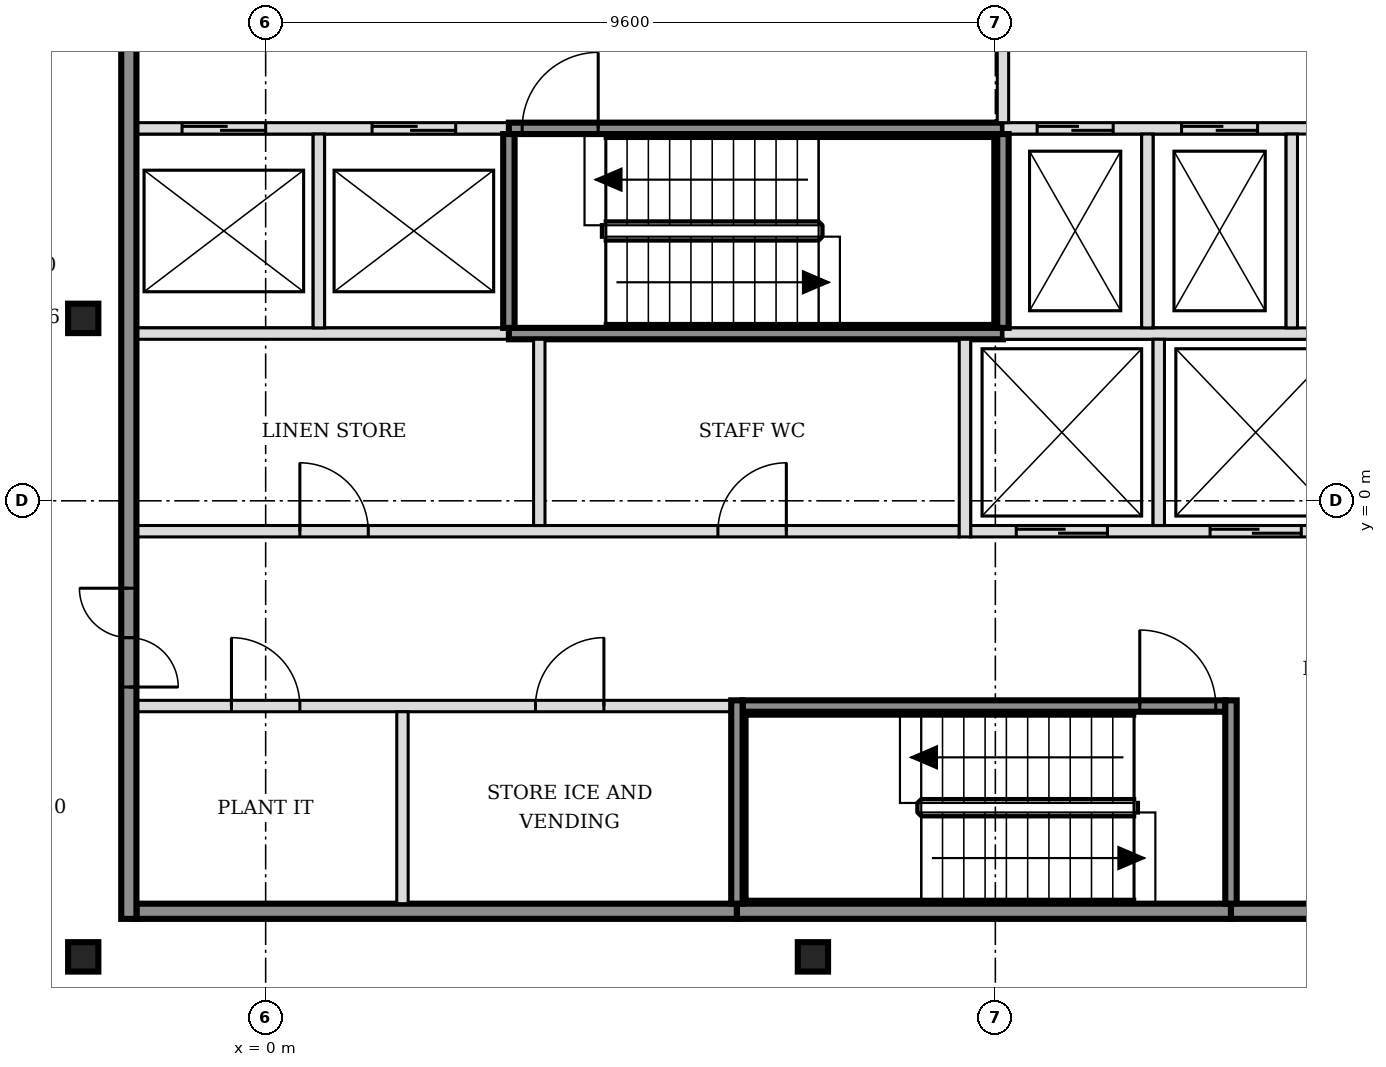
"""IFC4 building model, lengths in metres.
Left out: names, types, materials, properties, quantities, classifications, styles, units other than length and angle.
Written with IfcOpenShell. Run it as: python <this file> out.ifc"""

import sys

from ifc_helpers import new_model, si_unit, direction, frame, frame_2d, origin, origin_2d, place, context, subcontext, project, spatial, rectangle, i_section, extrude, element, fill, save


model = new_model("IFC4")
c1 = context("Model", 3, precision=1e-05, world=origin(), true_north=direction((0.0, 1.0)))
c2 = subcontext(c1, "Body", "Model", "MODEL_VIEW")
j1 = project(units=[si_unit("LENGTHUNIT", "METRE"), si_unit("PLANEANGLEUNIT", "RADIAN")], contexts=[c1])
p1 = place(None, origin())
s1 = spatial("IfcSite", under=j1, at=p1, CompositionType="ELEMENT")
p2 = place(p1, origin())
s2 = spatial("IfcBuilding", under=s1, at=p2, CompositionType="ELEMENT")
p3 = place(p2, frame((0.0, 0.0, 253.8)))
s3 = spatial("IfcBuildingStorey", under=s2, at=p3, CompositionType="ELEMENT", Elevation=253.8)
for number, where, z_axis, x_axis in (
    (1, (-2.4, -6.0, -0.15), (0.0, 0.0, 1.0), (1.0, 0.0, 0.0)),
    (2, (7.2, -6.0, -0.15), (0.0, 0.0, 1.0), (1.0, 0.0, 0.0)),
    (3, (-2.4, 2.4, -0.15), (0.0, 0.0, 1.0), (1.0, 0.0, 0.0)),
):
    element("IfcColumn", number, at=place(p3, frame(where, z_axis=z_axis, x_axis=x_axis)), inside=s3, PredefinedType="COLUMN", context=c2, shape_type="SweptSolid", body=[
        extrude(i_section(OverallWidth=0.398, OverallDepth=0.387, WebThickness=0.021, FlangeThickness=0.033, FilletRadius=0.015, at=origin_2d()), origin(), (0.0, 0.0, 1.0), 3.6),
    ])
p4 = place(p3, frame((-1.7, -5.4, 0.0), z_axis=(0.0, 0.0, 1.0), x_axis=(1.0, 0.0, 0.0)))
e4 = element("IfcWall", 4, at=p4, inside=s3, PredefinedType="SOLIDWALL", context=c2, shape_type="SweptSolid", body=[
    extrude(rectangle(XDim=7.9, YDim=0.2, at=frame_2d((3.95, 0.0))), origin(), (0.0, 0.0, 1.0), 3.45),
])
p5 = place(p3, frame((6.2, -5.4, 0.0), z_axis=(0.0, 0.0, 1.0), x_axis=(1.0, 0.0, 0.0)))
e5 = element("IfcWall", 5, at=p5, inside=s3, PredefinedType="SOLIDWALL", context=c2, shape_type="SweptSolid", body=[
    extrude(rectangle(XDim=6.5, YDim=0.2, at=frame_2d((3.25, 0.0))), origin(), (0.0, 0.0, 1.0), 3.45),
])
p6 = place(p3, frame((12.7, -5.4, 0.0), z_axis=(0.0, 0.0, 1.0), x_axis=(1.0, 0.0, 0.0)))
e6 = element("IfcWall", 6, at=p6, inside=s3, PredefinedType="SOLIDWALL", context=c2, shape_type="SweptSolid", body=[
    extrude(rectangle(XDim=3.4, YDim=0.2, at=frame_2d((1.7, 0.0))), origin(), (0.0, 0.0, 1.0), 3.45),
])
p7 = place(p3, frame((-1.7, -2.7, 0.0), z_axis=(0.0, 0.0, 1.0), x_axis=(1.0, 0.0, 0.0)))
e7 = element("IfcWall", 7, at=p7, inside=s3, PredefinedType="PARTITIONING", context=c2, shape_type="SweptSolid", body=[
    extrude(rectangle(XDim=7.825, YDim=0.15, at=frame_2d((3.913, 0.0))), origin(), (0.0, 0.0, 1.0), 3.45),
])
p8 = place(p7, frame((1.25, 0.0, 0.0)))
e8 = element("IfcOpeningElement", 8, at=p8, cuts=e7, PredefinedType="OPENING", context=c2, shape_type="SweptSolid", body=[
    extrude(rectangle(XDim=0.9, YDim=2.1, at=frame_2d((0.45, 1.05))), frame((0.0, 0.085, 0.0), z_axis=(0.0, -1.0, 0.0), x_axis=(1.0, 0.0, 0.0)), (0.0, 0.0, 1.0), 0.17),
])
p9 = place(p7, frame((5.25, 0.0, 0.0)))
e9 = element("IfcOpeningElement", 9, at=p9, cuts=e7, PredefinedType="OPENING", context=c2, shape_type="SweptSolid", body=[
    extrude(rectangle(XDim=0.9, YDim=2.1, at=frame_2d((0.45, 1.05))), frame((0.0, 0.085, 0.0), z_axis=(0.0, -1.0, 0.0), x_axis=(1.0, 0.0, 0.0)), (0.0, 0.0, 1.0), 0.17),
])
p10 = place(p3, frame((6.275, -2.7, 0.0), z_axis=(0.0, 0.0, 1.0), x_axis=(1.0, 0.0, 0.0)))
e10 = element("IfcWall", 10, at=p10, inside=s3, PredefinedType="SOLIDWALL", context=c2, shape_type="SweptSolid", body=[
    extrude(rectangle(XDim=6.35, YDim=0.15, at=frame_2d((3.175, 0.0))), origin(), (0.0, 0.0, 1.0), 3.45),
])
p11 = place(p10, frame((5.225, 0.0, 0.0)))
e11 = element("IfcOpeningElement", 11, at=p11, cuts=e10, PredefinedType="OPENING", context=c2, shape_type="SweptSolid", body=[
    extrude(rectangle(XDim=1.0, YDim=2.1, at=frame_2d((0.5, 1.05))), frame((0.0, 0.085, 0.0), z_axis=(0.0, -1.0, 0.0), x_axis=(1.0, 0.0, 0.0)), (0.0, 0.0, 1.0), 0.17),
])
p12 = place(p3, frame((-1.7, -0.4, 0.0), z_axis=(0.0, 0.0, 1.0), x_axis=(1.0, 0.0, 0.0)))
e12 = element("IfcWall", 12, at=p12, inside=s3, PredefinedType="PARTITIONING", context=c2, shape_type="SweptSolid", body=[
    extrude(rectangle(XDim=10.825, YDim=0.15, at=frame_2d((5.413, 0.0))), origin(), (0.0, 0.0, 1.0), 3.45),
])
p13 = place(p12, frame((2.15, 0.0, 0.0)))
e13 = element("IfcOpeningElement", 13, at=p13, cuts=e12, PredefinedType="OPENING", context=c2, shape_type="SweptSolid", body=[
    extrude(rectangle(XDim=0.9, YDim=2.1, at=frame_2d((0.45, 1.05))), frame((0.0, 0.085, 0.0), z_axis=(0.0, -1.0, 0.0), x_axis=(1.0, 0.0, 0.0)), (0.0, 0.0, 1.0), 0.17),
])
p14 = place(p12, frame((7.65, 0.0, 0.0)))
e14 = element("IfcOpeningElement", 14, at=p14, cuts=e12, PredefinedType="OPENING", context=c2, shape_type="SweptSolid", body=[
    extrude(rectangle(XDim=0.9, YDim=2.1, at=frame_2d((0.45, 1.05))), frame((0.0, 0.085, 0.0), z_axis=(0.0, -1.0, 0.0), x_axis=(1.0, 0.0, 0.0)), (0.0, 0.0, 1.0), 0.17),
])
p15 = place(p3, frame((9.275, -0.4, 0.0), z_axis=(0.0, 0.0, 1.0), x_axis=(1.0, 0.0, 0.0)))
e15 = element("IfcWall", 15, at=p15, inside=s3, PredefinedType="SOLIDWALL", context=c2, shape_type="SweptSolid", body=[
    extrude(rectangle(XDim=4.95, YDim=0.15, at=frame_2d((2.475, 0.0))), origin(), (0.0, 0.0, 1.0), 3.45),
])
p16 = place(p15, frame((0.6, 0.0, 0.0)))
e16 = element("IfcOpeningElement", 16, at=p16, cuts=e15, PredefinedType="OPENING", context=c2, shape_type="SweptSolid", body=[
    extrude(rectangle(XDim=1.2, YDim=2.1, at=frame_2d((0.6, 1.05))), frame((0.0, 0.085, 0.0), z_axis=(0.0, -1.0, 0.0), x_axis=(1.0, 0.0, 0.0)), (0.0, 0.0, 1.0), 0.17),
])
p17 = place(p15, frame((3.15, 0.0, 0.0)))
e17 = element("IfcOpeningElement", 17, at=p17, cuts=e15, PredefinedType="OPENING", context=c2, shape_type="SweptSolid", body=[
    extrude(rectangle(XDim=1.2, YDim=2.1, at=frame_2d((0.6, 1.05))), frame((0.0, 0.085, 0.0), z_axis=(0.0, -1.0, 0.0), x_axis=(1.0, 0.0, 0.0)), (0.0, 0.0, 1.0), 0.17),
])
p18 = place(p3, frame((-1.7, 2.2, 0.0), z_axis=(0.0, 0.0, 1.0), x_axis=(1.0, 0.0, 0.0)))
e18 = element("IfcWall", 18, at=p18, inside=s3, PredefinedType="SOLIDWALL", context=c2, shape_type="SweptSolid", body=[
    extrude(rectangle(XDim=4.9, YDim=0.15, at=frame_2d((2.45, 0.0))), origin(), (0.0, 0.0, 1.0), 3.45),
])
p19 = place(p3, frame((3.2, 2.2, 0.0), z_axis=(0.0, 0.0, 1.0), x_axis=(1.0, 0.0, 0.0)))
e19 = element("IfcWall", 19, at=p19, inside=s3, PredefinedType="SOLIDWALL", context=c2, shape_type="SweptSolid", body=[
    extrude(rectangle(XDim=6.5, YDim=0.15, at=frame_2d((3.25, 0.0))), origin(), (0.0, 0.0, 1.0), 3.45),
])
p20 = place(p3, frame((9.7, 2.2, 0.0), z_axis=(0.0, 0.0, 1.0), x_axis=(1.0, 0.0, 0.0)))
e20 = element("IfcWall", 20, at=p20, inside=s3, PredefinedType="SOLIDWALL", context=c2, shape_type="SweptSolid", body=[
    extrude(rectangle(XDim=4.525, YDim=0.15, at=frame_2d((2.263, 0.0))), origin(), (0.0, 0.0, 1.0), 3.45),
])
p21 = place(p3, frame((-1.7, 4.9, 0.0), z_axis=(0.0, 0.0, 1.0), x_axis=(1.0, 0.0, 0.0)))
e21 = element("IfcWall", 21, at=p21, inside=s3, PredefinedType="SOLIDWALL", context=c2, shape_type="SweptSolid", body=[
    extrude(rectangle(XDim=4.9, YDim=0.15, at=frame_2d((2.45, 0.0))), origin(), (0.0, 0.0, 1.0), 3.45),
])
p22 = place(p21, frame((0.6, 0.0, 0.0)))
e22 = element("IfcOpeningElement", 22, at=p22, cuts=e21, PredefinedType="OPENING", context=c2, shape_type="SweptSolid", body=[
    extrude(rectangle(XDim=1.1, YDim=2.1, at=frame_2d((0.55, 1.05))), frame((0.0, 0.085, 0.0), z_axis=(0.0, -1.0, 0.0), x_axis=(1.0, 0.0, 0.0)), (0.0, 0.0, 1.0), 0.17),
])
p23 = place(p21, frame((3.1, 0.0, 0.0)))
e23 = element("IfcOpeningElement", 23, at=p23, cuts=e21, PredefinedType="OPENING", context=c2, shape_type="SweptSolid", body=[
    extrude(rectangle(XDim=1.1, YDim=2.1, at=frame_2d((0.55, 1.05))), frame((0.0, 0.085, 0.0), z_axis=(0.0, -1.0, 0.0), x_axis=(1.0, 0.0, 0.0)), (0.0, 0.0, 1.0), 0.17),
])
p24 = place(p3, frame((3.2, 4.9, 0.0), z_axis=(0.0, 0.0, 1.0), x_axis=(1.0, 0.0, 0.0)))
e24 = element("IfcWall", 24, at=p24, inside=s3, PredefinedType="SOLIDWALL", context=c2, shape_type="SweptSolid", body=[
    extrude(rectangle(XDim=6.5, YDim=0.15, at=frame_2d((3.25, 0.0))), origin(), (0.0, 0.0, 1.0), 3.45),
])
p25 = place(p24, frame((0.175, 0.0, 0.0)))
e25 = element("IfcOpeningElement", 25, at=p25, cuts=e24, PredefinedType="OPENING", context=c2, shape_type="SweptSolid", body=[
    extrude(rectangle(XDim=1.0, YDim=2.1, at=frame_2d((0.5, 1.05))), frame((0.0, 0.085, 0.0), z_axis=(0.0, -1.0, 0.0), x_axis=(1.0, 0.0, 0.0)), (0.0, 0.0, 1.0), 0.17),
])
p26 = place(p3, frame((9.7, 4.9, 0.0), z_axis=(0.0, 0.0, 1.0), x_axis=(1.0, 0.0, 0.0)))
e26 = element("IfcWall", 26, at=p26, inside=s3, PredefinedType="SOLIDWALL", context=c2, shape_type="SweptSolid", body=[
    extrude(rectangle(XDim=6.4, YDim=0.15, at=frame_2d((3.2, 0.0))), origin(), (0.0, 0.0, 1.0), 3.45),
])
p27 = place(p26, frame((0.45, 0.0, 0.0)))
e27 = element("IfcOpeningElement", 27, at=p27, cuts=e26, PredefinedType="OPENING", context=c2, shape_type="SweptSolid", body=[
    extrude(rectangle(XDim=1.0, YDim=2.1, at=frame_2d((0.5, 1.05))), frame((0.0, 0.085, 0.0), z_axis=(0.0, -1.0, 0.0), x_axis=(1.0, 0.0, 0.0)), (0.0, 0.0, 1.0), 0.17),
])
p28 = place(p26, frame((2.35, 0.0, 0.0)))
e28 = element("IfcOpeningElement", 28, at=p28, cuts=e26, PredefinedType="OPENING", context=c2, shape_type="SweptSolid", body=[
    extrude(rectangle(XDim=1.0, YDim=2.1, at=frame_2d((0.5, 1.05))), frame((0.0, 0.085, 0.0), z_axis=(0.0, -1.0, 0.0), x_axis=(1.0, 0.0, 0.0)), (0.0, 0.0, 1.0), 0.17),
])
p29 = place(p26, frame((4.7, 0.0, 0.0)))
e29 = element("IfcOpeningElement", 29, at=p29, cuts=e26, PredefinedType="OPENING", context=c2, shape_type="SweptSolid", body=[
    extrude(rectangle(XDim=0.9, YDim=2.1, at=frame_2d((0.45, 1.05))), frame((0.0, 0.085, 0.0), z_axis=(0.0, -1.0, 0.0), x_axis=(1.0, 0.0, 0.0)), (0.0, 0.0, 1.0), 0.17),
])
p30 = place(p3, frame((-1.8, -5.5, 0.0), z_axis=(0.0, 0.0, 1.0), x_axis=(0.0, 1.0, 0.0)))
e30 = element("IfcWall", 30, at=p30, inside=s3, PredefinedType="SOLIDWALL", context=c2, shape_type="SweptSolid", body=[
    extrude(rectangle(XDim=15.8, YDim=0.2, at=frame_2d((7.9, 0.0))), origin(), (0.0, 0.0, 1.0), 3.45),
])
p31 = place(p30, frame((3.05, 0.0, 0.0)))
e31 = element("IfcOpeningElement", 31, at=p31, cuts=e30, PredefinedType="OPENING", context=c2, shape_type="SweptSolid", body=[
    extrude(rectangle(XDim=1.3, YDim=2.1, at=frame_2d((0.65, 1.05))), frame((0.0, 0.11, 0.0), z_axis=(0.0, -1.0, 0.0), x_axis=(1.0, 0.0, 0.0)), (0.0, 0.0, 1.0), 0.22),
])
p32 = place(p30, frame((11.45, 0.0, 0.0)))
e32 = element("IfcOpeningElement", 32, at=p32, cuts=e30, PredefinedType="OPENING", context=c2, shape_type="SweptSolid", body=[
    extrude(rectangle(XDim=1.3, YDim=2.1, at=frame_2d((0.65, 1.05))), frame((0.0, 0.11, 0.0), z_axis=(0.0, -1.0, 0.0), x_axis=(1.0, 0.0, 0.0)), (0.0, 0.0, 1.0), 0.22),
])
p33 = place(p3, frame((0.7, 2.275, 0.0), z_axis=(0.0, 0.0, 1.0), x_axis=(0.0, 1.0, 0.0)))
e33 = element("IfcWall", 33, at=p33, inside=s3, PredefinedType="SOLIDWALL", context=c2, shape_type="SweptSolid", body=[
    extrude(rectangle(XDim=2.55, YDim=0.15, at=frame_2d((1.275, 0.0))), origin(), (0.0, 0.0, 1.0), 3.45),
])
p34 = place(p3, frame((1.8, -5.3, 0.0), z_axis=(0.0, 0.0, 1.0), x_axis=(0.0, 1.0, 0.0)))
e34 = element("IfcWall", 34, at=p34, inside=s3, PredefinedType="PARTITIONING", context=c2, shape_type="SweptSolid", body=[
    extrude(rectangle(XDim=2.525, YDim=0.15, at=frame_2d((1.263, 0.0))), origin(), (0.0, 0.0, 1.0), 3.45),
])
p35 = place(p3, frame((3.2, 2.275, 0.0), z_axis=(0.0, 0.0, 1.0), x_axis=(0.0, 1.0, 0.0)))
e35 = element("IfcWall", 35, at=p35, inside=s3, PredefinedType="SOLIDWALL", context=c2, shape_type="SweptSolid", body=[
    extrude(rectangle(XDim=2.55, YDim=0.15, at=frame_2d((1.275, 0.0))), origin(), (0.0, 0.0, 1.0), 3.45),
])
p36 = place(p3, frame((3.6, -0.325, 0.0), z_axis=(0.0, 0.0, 1.0), x_axis=(0.0, 1.0, 0.0)))
e36 = element("IfcWall", 36, at=p36, inside=s3, PredefinedType="PARTITIONING", context=c2, shape_type="SweptSolid", body=[
    extrude(rectangle(XDim=2.45, YDim=0.15, at=frame_2d((1.225, 0.0))), origin(), (0.0, 0.0, 1.0), 3.45),
])
p37 = place(p3, frame((6.2, -5.3, 0.0), z_axis=(0.0, 0.0, 1.0), x_axis=(0.0, 1.0, 0.0)))
e37 = element("IfcWall", 37, at=p37, inside=s3, PredefinedType="SOLIDWALL", context=c2, shape_type="SweptSolid", body=[
    extrude(rectangle(XDim=2.675, YDim=0.15, at=frame_2d((1.337, 0.0))), origin(), (0.0, 0.0, 1.0), 3.45),
])
p38 = place(p3, frame((9.2, -0.475, 0.0), z_axis=(0.0, 0.0, 1.0), x_axis=(0.0, 1.0, 0.0)))
e38 = element("IfcWall", 38, at=p38, inside=s3, PredefinedType="SOLIDWALL", context=c2, shape_type="SweptSolid", body=[
    extrude(rectangle(XDim=2.6, YDim=0.15, at=frame_2d((1.3, 0.0))), origin(), (0.0, 0.0, 1.0), 3.45),
])
p39 = place(p3, frame((9.7, 2.275, 0.0), z_axis=(0.0, 0.0, 1.0), x_axis=(0.0, 1.0, 0.0)))
e39 = element("IfcWall", 39, at=p39, inside=s3, PredefinedType="SOLIDWALL", context=c2, shape_type="SweptSolid", body=[
    extrude(rectangle(XDim=2.55, YDim=0.15, at=frame_2d((1.275, 0.0))), origin(), (0.0, 0.0, 1.0), 3.45),
])
p40 = place(p3, frame((9.7, 4.975, 0.0), z_axis=(0.0, 0.0, 1.0), x_axis=(0.0, 1.0, 0.0)))
e40 = element("IfcWall", 40, at=p40, inside=s3, PredefinedType="SOLIDWALL", context=c2, shape_type="SweptSolid", body=[
    extrude(rectangle(XDim=2.45, YDim=0.15, at=frame_2d((1.225, 0.0))), origin(), (0.0, 0.0, 1.0), 3.45),
])
p41 = place(p3, frame((11.6, 2.275, 0.0), z_axis=(0.0, 0.0, 1.0), x_axis=(0.0, 1.0, 0.0)))
e41 = element("IfcWall", 41, at=p41, inside=s3, PredefinedType="SOLIDWALL", context=c2, shape_type="SweptSolid", body=[
    extrude(rectangle(XDim=2.55, YDim=0.15, at=frame_2d((1.275, 0.0))), origin(), (0.0, 0.0, 1.0), 3.45),
])
p42 = place(p3, frame((11.75, -0.325, 0.0), z_axis=(0.0, 0.0, 1.0), x_axis=(0.0, 1.0, 0.0)))
e42 = element("IfcWall", 42, at=p42, inside=s3, PredefinedType="SOLIDWALL", context=c2, shape_type="SweptSolid", body=[
    extrude(rectangle(XDim=2.45, YDim=0.15, at=frame_2d((1.225, 0.0))), origin(), (0.0, 0.0, 1.0), 3.45),
])
p43 = place(p3, frame((12.7, -5.3, 0.0), z_axis=(0.0, 0.0, 1.0), x_axis=(0.0, 1.0, 0.0)))
e43 = element("IfcWall", 43, at=p43, inside=s3, PredefinedType="SOLIDWALL", context=c2, shape_type="SweptSolid", body=[
    extrude(rectangle(XDim=2.675, YDim=0.15, at=frame_2d((1.337, 0.0))), origin(), (0.0, 0.0, 1.0), 3.45),
])
p44 = place(p3, frame((13.5, 2.275, 0.0), z_axis=(0.0, 0.0, 1.0), x_axis=(0.0, 1.0, 0.0)))
e44 = element("IfcWall", 44, at=p44, inside=s3, PredefinedType="SOLIDWALL", context=c2, shape_type="SweptSolid", body=[
    extrude(rectangle(XDim=2.55, YDim=0.15, at=frame_2d((1.275, 0.0))), origin(), (0.0, 0.0, 1.0), 3.45),
])
p45 = place(p16, origin())
e45 = element("IfcDoor", 45, at=p45, inside=s3, OperationType="DOUBLE_DOOR_SLIDING", PredefinedType="DOOR", context=c2, shape_type="SweptSolid", body=[
    extrude(rectangle(XDim=1.2, YDim=2.1, at=frame_2d((0.6, 1.05))), frame((0.0, 0.025, 0.0), z_axis=(0.0, -1.0, 0.0), x_axis=(1.0, 0.0, 0.0)), (0.0, 0.0, 1.0), 0.05),
])
fill(e16, e45)
p46 = place(p17, origin())
e46 = element("IfcDoor", 46, at=p46, inside=s3, OperationType="DOUBLE_DOOR_SLIDING", PredefinedType="DOOR", context=c2, shape_type="SweptSolid", body=[
    extrude(rectangle(XDim=1.2, YDim=2.1, at=frame_2d((0.6, 1.05))), frame((0.0, 0.025, 0.0), z_axis=(0.0, -1.0, 0.0), x_axis=(1.0, 0.0, 0.0)), (0.0, 0.0, 1.0), 0.05),
])
fill(e17, e46)
p47 = place(p22, origin())
e47 = element("IfcDoor", 47, at=p47, inside=s3, OperationType="DOUBLE_DOOR_SLIDING", PredefinedType="DOOR", context=c2, shape_type="SweptSolid", body=[
    extrude(rectangle(XDim=1.1, YDim=2.1, at=frame_2d((0.55, 1.05))), frame((0.0, 0.025, 0.0), z_axis=(0.0, -1.0, 0.0), x_axis=(1.0, 0.0, 0.0)), (0.0, 0.0, 1.0), 0.05),
])
fill(e22, e47)
p48 = place(p23, origin())
e48 = element("IfcDoor", 48, at=p48, inside=s3, OperationType="DOUBLE_DOOR_SLIDING", PredefinedType="DOOR", context=c2, shape_type="SweptSolid", body=[
    extrude(rectangle(XDim=1.1, YDim=2.1, at=frame_2d((0.55, 1.05))), frame((0.0, 0.025, 0.0), z_axis=(0.0, -1.0, 0.0), x_axis=(1.0, 0.0, 0.0)), (0.0, 0.0, 1.0), 0.05),
])
fill(e23, e48)
p49 = place(p27, origin())
e49 = element("IfcDoor", 49, at=p49, inside=s3, OperationType="DOUBLE_DOOR_SLIDING", PredefinedType="DOOR", context=c2, shape_type="SweptSolid", body=[
    extrude(rectangle(XDim=1.0, YDim=2.1, at=frame_2d((0.5, 1.05))), frame((0.0, 0.025, 0.0), z_axis=(0.0, -1.0, 0.0), x_axis=(1.0, 0.0, 0.0)), (0.0, 0.0, 1.0), 0.05),
])
fill(e27, e49)
p50 = place(p28, origin())
e50 = element("IfcDoor", 50, at=p50, inside=s3, OperationType="DOUBLE_DOOR_SLIDING", PredefinedType="DOOR", context=c2, shape_type="SweptSolid", body=[
    extrude(rectangle(XDim=1.0, YDim=2.1, at=frame_2d((0.5, 1.05))), frame((0.0, 0.025, 0.0), z_axis=(0.0, -1.0, 0.0), x_axis=(1.0, 0.0, 0.0)), (0.0, 0.0, 1.0), 0.05),
])
fill(e28, e50)
p51 = place(p11, origin())
e51 = element("IfcDoor", 51, at=p51, inside=s3, OperationType="SINGLE_SWING_LEFT", PredefinedType="DOOR", context=c2, shape_type="SweptSolid", body=[
    extrude(rectangle(XDim=1.0, YDim=2.1, at=frame_2d((0.5, 1.05))), frame((0.0, 0.025, 0.0), z_axis=(0.0, -1.0, 0.0), x_axis=(1.0, 0.0, 0.0)), (0.0, 0.0, 1.0), 0.05),
])
fill(e11, e51)
p52 = place(p25, origin())
e52 = element("IfcDoor", 52, at=p52, inside=s3, OperationType="SINGLE_SWING_RIGHT", PredefinedType="DOOR", context=c2, shape_type="SweptSolid", body=[
    extrude(rectangle(XDim=1.0, YDim=2.1, at=frame_2d((0.5, 1.05))), frame((0.0, 0.025, 0.0), z_axis=(0.0, -1.0, 0.0), x_axis=(1.0, 0.0, 0.0)), (0.0, 0.0, 1.0), 0.05),
])
fill(e25, e52)
p53 = place(p31, origin())
e53 = element("IfcDoor", 53, at=p53, inside=s3, OperationType="DOUBLE_DOOR_SINGLE_SWING", PredefinedType="DOOR", context=c2, shape_type="SweptSolid", body=[
    extrude(rectangle(XDim=1.3, YDim=2.1, at=frame_2d((0.65, 1.05))), frame((0.0, 0.025, 0.0), z_axis=(0.0, -1.0, 0.0), x_axis=(1.0, 0.0, 0.0)), (0.0, 0.0, 1.0), 0.05),
])
fill(e31, e53)
p54 = place(p8, origin())
e54 = element("IfcDoor", 54, at=p54, inside=s3, OperationType="SINGLE_SWING_LEFT", PredefinedType="DOOR", context=c2, shape_type="SweptSolid", body=[
    extrude(rectangle(XDim=0.9, YDim=2.1, at=frame_2d((0.45, 1.05))), frame((0.0, 0.025, 0.0), z_axis=(0.0, -1.0, 0.0), x_axis=(1.0, 0.0, 0.0)), (0.0, 0.0, 1.0), 0.05),
])
fill(e8, e54)
p55 = place(p9, origin())
e55 = element("IfcDoor", 55, at=p55, inside=s3, OperationType="SINGLE_SWING_RIGHT", PredefinedType="DOOR", context=c2, shape_type="SweptSolid", body=[
    extrude(rectangle(XDim=0.9, YDim=2.1, at=frame_2d((0.45, 1.05))), frame((0.0, 0.025, 0.0), z_axis=(0.0, -1.0, 0.0), x_axis=(1.0, 0.0, 0.0)), (0.0, 0.0, 1.0), 0.05),
])
fill(e9, e55)
p56 = place(p13, origin())
e56 = element("IfcDoor", 56, at=p56, inside=s3, OperationType="SINGLE_SWING_LEFT", PredefinedType="DOOR", context=c2, shape_type="SweptSolid", body=[
    extrude(rectangle(XDim=0.9, YDim=2.1, at=frame_2d((0.45, 1.05))), frame((0.0, 0.025, 0.0), z_axis=(0.0, -1.0, 0.0), x_axis=(1.0, 0.0, 0.0)), (0.0, 0.0, 1.0), 0.05),
])
fill(e13, e56)
p57 = place(p14, origin())
e57 = element("IfcDoor", 57, at=p57, inside=s3, OperationType="SINGLE_SWING_RIGHT", PredefinedType="DOOR", context=c2, shape_type="SweptSolid", body=[
    extrude(rectangle(XDim=0.9, YDim=2.1, at=frame_2d((0.45, 1.05))), frame((0.0, 0.025, 0.0), z_axis=(0.0, -1.0, 0.0), x_axis=(1.0, 0.0, 0.0)), (0.0, 0.0, 1.0), 0.05),
])
fill(e14, e57)
save(model, sys.argv[1])
